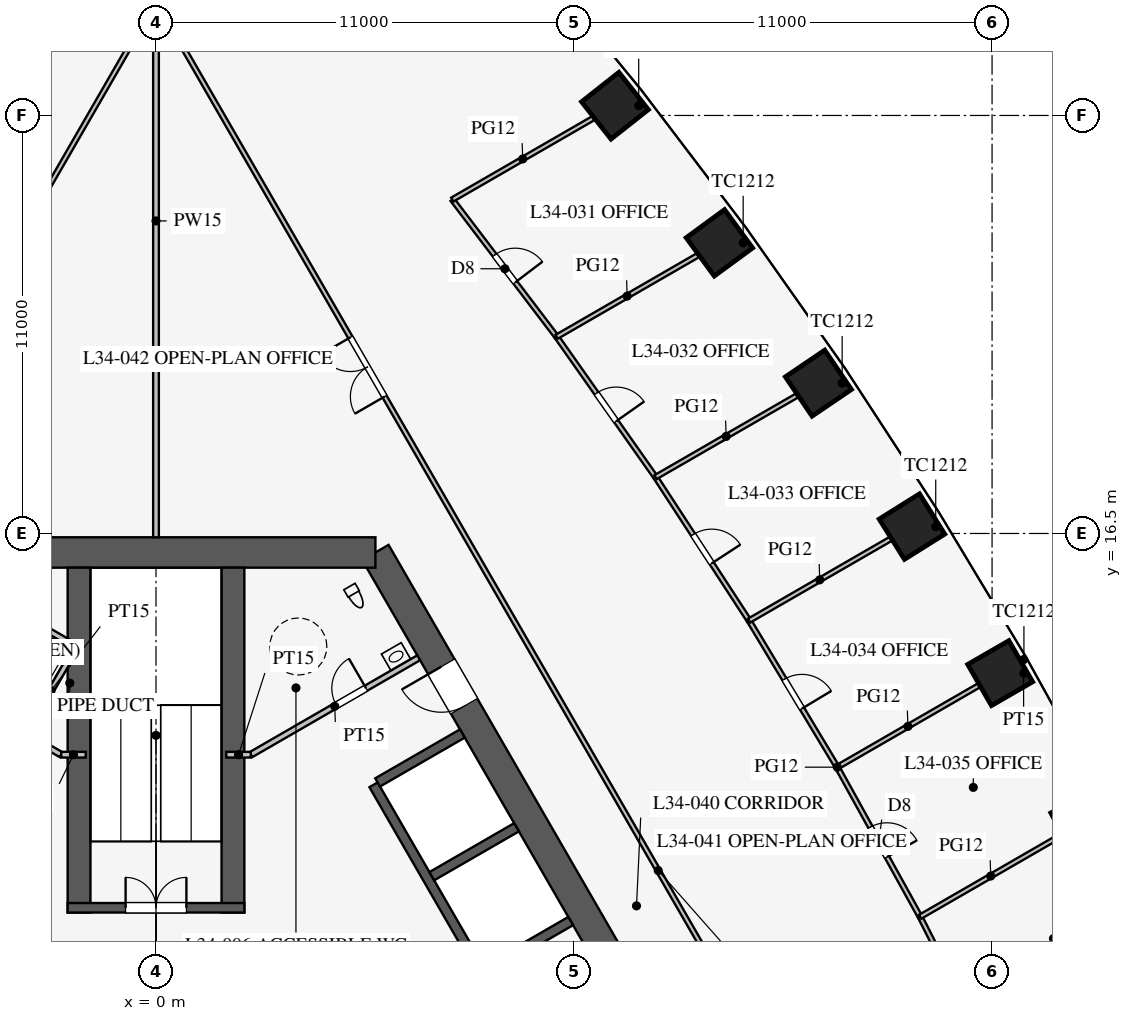
"""IFC4 building model, lengths in metres.
Left out: names, types, materials, properties, quantities, classifications, styles, units other than length and angle.
Written with IfcOpenShell. Run it as: python <this file> out.ifc"""

import sys

from ifc_helpers import new_model, si_unit, direction, frame, frame_2d, origin, origin_2d, place, context, subcontext, project, spatial, rectangle, extrude, element, fill, save


model = new_model("IFC4")
c1 = context("Model", 3, precision=1e-05, world=origin(), true_north=direction((0.0, 1.0)))
c2 = subcontext(c1, "Body", "Model", "MODEL_VIEW")
j1 = project(units=[si_unit("LENGTHUNIT", "METRE"), si_unit("PLANEANGLEUNIT", "RADIAN")], contexts=[c1])
p1 = place(None, origin())
s1 = spatial("IfcSite", under=j1, at=p1, CompositionType="ELEMENT")
p2 = place(p1, origin())
s2 = spatial("IfcBuilding", under=s1, at=p2, CompositionType="ELEMENT")
p3 = place(p2, frame((0.0, 0.0, 149.3)))
s3 = spatial("IfcBuildingStorey", under=s2, at=p3, CompositionType="ELEMENT", Elevation=149.3)
for number, where, z_axis, x_axis in (
    (1, (24.393, 8.887, 0.0), (0.0, 0.0, 1.0), (-0.468, 0.883, 0.0)),
    (2, (22.213, 12.825, 0.0), (0.0, 0.0, 1.0), (-0.5, 0.866, 0.0)),
    (3, (19.893, 16.681, 0.0), (0.0, 0.0, 1.0), (-0.531, 0.847, 0.0)),
    (4, (17.43, 20.456, 0.0), (0.0, 0.0, 1.0), (-0.561, 0.828, 0.0)),
    (5, (14.825, 24.148, 0.0), (0.0, 0.0, 1.0), (-0.591, 0.807, 0.0)),
    (6, (12.077, 27.757, 0.0), (0.0, 0.0, 1.0), (-0.62, 0.785, 0.0)),
):
    element("IfcColumn", number, at=place(p3, frame(where, z_axis=z_axis, x_axis=x_axis)), inside=s3, PredefinedType="COLUMN", context=c2, shape_type="SweptSolid", body=[
        extrude(rectangle(XDim=1.25, YDim=1.25, at=origin_2d()), origin(), (0.0, 0.0, 1.0), 4.2),
    ])
p4 = place(p3, frame((16.743, -3.0, 0.0), z_axis=(0.0, 0.0, 1.0), x_axis=(-0.500002442456, 0.866023993627, 0.0)))
e7 = element("IfcWall", 7, at=p4, inside=s3, PredefinedType="SHEAR", context=c2, shape_type="SweptSolid", body=[
    extrude(rectangle(XDim=21.939, YDim=0.8, at=frame_2d((10.97, 0.0))), origin(), (0.0, 0.0, 1.0), 4.2),
])
p5 = place(p4, frame((17.27, 0.0, 0.0)))
e8 = element("IfcOpeningElement", 8, at=p5, cuts=e7, PredefinedType="OPENING", context=c2, shape_type="SweptSolid", body=[
    extrude(rectangle(XDim=1.2, YDim=2.1, at=frame_2d((0.6, 1.05))), frame((0.0, 0.41, 0.0), z_axis=(0.0, -1.0, 0.0), x_axis=(1.0, 0.0, 0.0)), (0.0, 0.0, 1.0), 0.82),
])
p6 = place(p4, frame((3.47, 0.0, 0.0)))
e9 = element("IfcOpeningElement", 9, at=p6, cuts=e7, PredefinedType="OPENING", context=c2, shape_type="SweptSolid", body=[
    extrude(rectangle(XDim=1.2, YDim=2.1, at=frame_2d((0.6, 1.05))), frame((0.0, 0.41, 0.0), z_axis=(0.0, -1.0, 0.0), x_axis=(1.0, 0.0, 0.0)), (0.0, 0.0, 1.0), 0.82),
])
p7 = place(p3, frame((5.773, 16.0, 0.0), z_axis=(0.0, 0.0, 1.0), x_axis=(-1.0, 0.0, 0.0)))
e10 = element("IfcWall", 10, at=p7, inside=s3, PredefinedType="SHEAR", context=c2, shape_type="SweptSolid", body=[
    extrude(rectangle(XDim=11.547, YDim=0.8, at=frame_2d((5.773, 0.0))), origin(), (0.0, 0.0, 1.0), 4.2),
])
p8 = place(p3, frame((11.424, 0.014, 0.0), z_axis=(0.0, 0.0, 1.0), x_axis=(-0.500001763848, 0.866024385424, 0.0)))
e11 = element("IfcWall", 11, at=p8, inside=s3, PredefinedType="SHEAR", context=c2, shape_type="SweptSolid", body=[
    extrude(rectangle(XDim=11.4, YDim=0.25, at=frame_2d((5.7, 0.0))), origin(), (0.0, 0.0, 1.0), 4.2),
])
p9 = place(p8, frame((0.975, 0.0, 0.0)))
e12 = element("IfcOpeningElement", 12, at=p9, cuts=e11, PredefinedType="OPENING", context=c2, shape_type="SweptSolid", body=[
    extrude(rectangle(XDim=0.9, YDim=2.1, at=frame_2d((0.45, 1.05))), frame((0.0, 0.135, 0.0), z_axis=(0.0, -1.0, 0.0), x_axis=(1.0, 0.0, 0.0)), (0.0, 0.0, 1.0), 0.27),
])
p10 = place(p8, frame((3.825, 0.0, 0.0)))
e13 = element("IfcOpeningElement", 13, at=p10, cuts=e11, PredefinedType="OPENING", context=c2, shape_type="SweptSolid", body=[
    extrude(rectangle(XDim=0.9, YDim=2.1, at=frame_2d((0.45, 1.05))), frame((0.0, 0.135, 0.0), z_axis=(0.0, -1.0, 0.0), x_axis=(1.0, 0.0, 0.0)), (0.0, 0.0, 1.0), 0.27),
])
for number, where, z_axis, x_axis in (
    (14, (8.682, 5.012, 0.0), (0.0, 0.0, 1.0), (0.866, 0.5, 0.0)),
    (15, (7.257, 7.481, 0.0), (0.0, 0.0, 1.0), (0.866, 0.5, 0.0)),
):
    element("IfcWall", number, at=place(p3, frame(where, z_axis=z_axis, x_axis=x_axis)), inside=s3, PredefinedType="SHEAR", context=c2, shape_type="SweptSolid", body=[
        extrude(rectangle(XDim=2.575, YDim=0.25, at=frame_2d((1.288, 0.0))), origin(), (0.0, 0.0, 1.0), 4.2),
    ])
p11 = place(p3, frame((5.832, 9.949, 0.0), z_axis=(0.0, 0.0, 1.0), x_axis=(0.866029291668, 0.499993265928, 0.0)))
e16 = element("IfcWall", 16, at=p11, inside=s3, PredefinedType="SHEAR", context=c2, shape_type="SweptSolid", body=[
    extrude(rectangle(XDim=2.575, YDim=0.25, at=frame_2d((1.288, 0.0))), origin(), (0.0, 0.0, 1.0), 4.2),
])
for number, where, z_axis, x_axis in (
    (17, (2.025, 6.525, 0.0), (0.0, 0.0, 1.0), (0.0, 1.0, 0.0)),
    (18, (-2.025, 6.525, 0.0), (0.0, 0.0, 1.0), (0.0, 1.0, 0.0)),
):
    element("IfcWall", number, at=place(p3, frame(where, z_axis=z_axis, x_axis=x_axis)), inside=s3, PredefinedType="SHEAR", context=c2, shape_type="SweptSolid", body=[
        extrude(rectangle(XDim=9.075, YDim=0.6, at=frame_2d((4.538, 0.0))), origin(), (0.0, 0.0, 1.0), 4.2),
    ])
p12 = place(p3, frame((2.325, 6.65, 0.0), z_axis=(0.0, 0.0, 1.0), x_axis=(-1.0, 0.0, 0.0)))
e19 = element("IfcWall", 19, at=p12, inside=s3, PredefinedType="SHEAR", context=c2, shape_type="SweptSolid", body=[
    extrude(rectangle(XDim=4.65, YDim=0.25, at=frame_2d((2.325, 0.0))), origin(), (0.0, 0.0, 1.0), 4.2),
])
p13 = place(p12, frame((1.525, 0.0, 0.0)))
e20 = element("IfcOpeningElement", 20, at=p13, cuts=e19, PredefinedType="OPENING", context=c2, shape_type="SweptSolid", body=[
    extrude(rectangle(XDim=1.6, YDim=2.1, at=frame_2d((0.8, 1.05))), frame((0.0, 0.135, 0.0), z_axis=(0.0, -1.0, 0.0), x_axis=(1.0, 0.0, 0.0)), (0.0, 0.0, 1.0), 0.27),
])
p14 = place(p3, frame((2.495, 10.678, 0.0), z_axis=(0.0, 0.0, 1.0), x_axis=(0.86602216432, 0.500005610874, 0.0)))
e21 = element("IfcWall", 21, at=p14, inside=s3, PredefinedType="PARTITIONING", context=c2, shape_type="SweptSolid", body=[
    extrude(rectangle(XDim=5.1, YDim=0.15, at=frame_2d((2.55, 0.0))), origin(), (0.0, 0.0, 1.0), 4.0),
])
p15 = place(p14, frame((2.6, 0.0, 0.0)))
e22 = element("IfcOpeningElement", 22, at=p15, cuts=e21, PredefinedType="OPENING", context=c2, shape_type="SweptSolid", body=[
    extrude(rectangle(XDim=0.9, YDim=2.1, at=frame_2d((0.45, 1.05))), frame((0.0, 0.085, 0.0), z_axis=(0.0, -1.0, 0.0), x_axis=(1.0, 0.0, 0.0)), (0.0, 0.0, 1.0), 0.17),
])
p16 = place(p3, frame((-2.495, 10.678, 0.0), z_axis=(0.0, 0.0, 1.0), x_axis=(-0.86602216432, 0.500005610874, 0.0)))
e23 = element("IfcWall", 23, at=p16, inside=s3, PredefinedType="PARTITIONING", context=c2, shape_type="SweptSolid", body=[
    extrude(rectangle(XDim=5.1, YDim=0.15, at=frame_2d((2.55, 0.0))), origin(), (0.0, 0.0, 1.0), 4.0),
])
p17 = place(p16, frame((2.6, 0.0, 0.0)))
e24 = element("IfcOpeningElement", 24, at=p17, cuts=e23, PredefinedType="OPENING", context=c2, shape_type="SweptSolid", body=[
    extrude(rectangle(XDim=0.9, YDim=2.1, at=frame_2d((0.45, 1.05))), frame((0.0, 0.085, 0.0), z_axis=(0.0, -1.0, 0.0), x_axis=(1.0, 0.0, 0.0)), (0.0, 0.0, 1.0), 0.17),
])
for number, where, z_axis, x_axis in (
    (25, (2.495, 10.678, 0.0), (0.0, 0.0, 1.0), (-1.0, 0.0, 0.0)),
    (26, (-2.495, 10.678, 0.0), (0.0, 0.0, 1.0), (1.0, 0.0, 0.0)),
):
    element("IfcWall", number, at=place(p3, frame(where, z_axis=z_axis, x_axis=x_axis)), inside=s3, PredefinedType="PARTITIONING", context=c2, shape_type="SweptSolid", body=[
        extrude(rectangle(XDim=0.645, YDim=0.15, at=frame_2d((0.323, 0.0))), origin(), (0.0, 0.0, 1.0), 4.0),
    ])
p18 = place(p3, frame((-2.031, 13.482, 0.0), z_axis=(0.0, 0.0, 1.0), x_axis=(-0.866050731258, 0.499956128963, 0.0)))
e27 = element("IfcWall", 27, at=p18, inside=s3, PredefinedType="PARTITIONING", context=c2, shape_type="SweptSolid", body=[
    extrude(rectangle(XDim=4.1, YDim=0.15, at=frame_2d((2.05, 0.0))), origin(), (0.0, 0.0, 1.0), 4.0),
])
p19 = place(p3, frame((-3.389, 11.281, 0.0), z_axis=(0.0, 0.0, 1.0), x_axis=(0.499989096993, 0.866031698547, 0.0)))
e28 = element("IfcWall", 28, at=p19, inside=s3, PredefinedType="PARTITIONING", context=c2, shape_type="SweptSolid", body=[
    extrude(rectangle(XDim=2.51, YDim=0.15, at=frame_2d((1.255, 0.0))), origin(), (0.0, 0.0, 1.0), 4.0),
])
p20 = place(p3, frame((0.0, 16.4, 0.0), z_axis=(0.0, 0.0, 1.0), x_axis=(0.0, 1.0, 0.0)))
e29 = element("IfcWall", 29, at=p20, inside=s3, PredefinedType="PARTITIONING", context=c2, shape_type="SweptSolid", body=[
    extrude(rectangle(XDim=16.65, YDim=0.15, at=frame_2d((8.325, 0.0))), origin(), (0.0, 0.0, 1.0), 2.3),
])
p21 = place(p3, frame((26.415, -15.231, 0.0), z_axis=(0.0, 0.0, 1.0), x_axis=(-0.50000091641, 0.866024874695, 0.0)))
e30 = element("IfcWall", 30, at=p21, inside=s3, PredefinedType="PARTITIONING", context=c2, shape_type="SweptSolid", body=[
    extrude(rectangle(XDim=52.796, YDim=0.12, at=frame_2d((26.398, 0.0))), origin(), (0.0, 0.0, 1.0), 2.9),
])
p22 = place(p21, frame((10.2, 0.0, 0.15)))
e31 = element("IfcOpeningElement", 31, at=p22, cuts=e30, PredefinedType="OPENING", context=c2, shape_type="SweptSolid", body=[
    extrude(rectangle(XDim=1.8, YDim=2.1, at=frame_2d((0.9, 1.05))), frame((0.0, 0.07, 0.0), z_axis=(0.0, -1.0, 0.0), x_axis=(1.0, 0.0, 0.0)), (0.0, 0.0, 1.0), 0.14),
])
p23 = place(p21, frame((40.8, 0.0, 0.15)))
e32 = element("IfcOpeningElement", 32, at=p23, cuts=e30, PredefinedType="OPENING", context=c2, shape_type="SweptSolid", body=[
    extrude(rectangle(XDim=1.8, YDim=2.1, at=frame_2d((0.9, 1.05))), frame((0.0, 0.07, 0.0), z_axis=(0.0, -1.0, 0.0), x_axis=(1.0, 0.0, 0.0)), (0.0, 0.0, 1.0), 0.14),
])
p24 = place(p3, frame((22.758, 13.139, 0.0), z_axis=(0.0, 0.0, 1.0), x_axis=(0.866063163075, 0.499934593286, 0.0)))
e33 = element("IfcWall", 33, at=p24, inside=s3, PredefinedType="PARTITIONING", context=c2, shape_type="SweptSolid", body=[
    extrude(rectangle(XDim=0.166, YDim=0.15, at=frame_2d((0.083, 0.0))), origin(), (0.0, 0.0, 1.0), 2.9),
])
p25 = place(p3, frame((17.927, 10.35, 0.0), z_axis=(0.0, 0.0, 1.0), x_axis=(-0.515548366618, 0.856860479703, 0.0)))
e34 = element("IfcWall", 34, at=p25, inside=s3, PredefinedType="PARTITIONING", context=c2, shape_type="SweptSolid", body=[
    extrude(rectangle(XDim=4.501, YDim=0.12, at=frame_2d((2.25, 0.0))), origin(), (0.0, 0.0, 1.0), 2.9),
])
p26 = place(p25, frame((1.8, 0.0, 0.15)))
e35 = element("IfcOpeningElement", 35, at=p26, cuts=e34, PredefinedType="OPENING", context=c2, shape_type="SweptSolid", body=[
    extrude(rectangle(XDim=0.9, YDim=2.1, at=frame_2d((0.45, 1.05))), frame((0.0, 0.07, 0.0), z_axis=(0.0, -1.0, 0.0), x_axis=(1.0, 0.0, 0.0)), (0.0, 0.0, 1.0), 0.14),
])
p27 = place(p3, frame((10.543, 21.675, 0.0), z_axis=(0.0, 0.0, 1.0), x_axis=(-0.605274299339, 0.796016973789, 0.0)))
e36 = element("IfcWall", 36, at=p27, inside=s3, PredefinedType="PARTITIONING", context=c2, shape_type="SweptSolid", body=[
    extrude(rectangle(XDim=4.536, YDim=0.12, at=frame_2d((2.268, 0.0))), origin(), (0.0, 0.0, 1.0), 2.9),
])
p28 = place(p27, frame((1.8, 0.0, 0.15)))
e37 = element("IfcOpeningElement", 37, at=p28, cuts=e36, PredefinedType="OPENING", context=c2, shape_type="SweptSolid", body=[
    extrude(rectangle(XDim=0.9, YDim=2.1, at=frame_2d((0.45, 1.05))), frame((0.0, 0.07, 0.0), z_axis=(0.0, -1.0, 0.0), x_axis=(1.0, 0.0, 0.0)), (0.0, 0.0, 1.0), 0.14),
])
p29 = place(p3, frame((15.606, 14.206, 0.0), z_axis=(0.0, 0.0, 1.0), x_axis=(-0.546069464151, 0.837739900161, 0.0)))
e38 = element("IfcWall", 38, at=p29, inside=s3, PredefinedType="PARTITIONING", context=c2, shape_type="SweptSolid", body=[
    extrude(rectangle(XDim=4.507, YDim=0.12, at=frame_2d((2.253, 0.0))), origin(), (0.0, 0.0, 1.0), 2.9),
])
p30 = place(p29, frame((1.8, 0.0, 0.15)))
e39 = element("IfcOpeningElement", 39, at=p30, cuts=e38, PredefinedType="OPENING", context=c2, shape_type="SweptSolid", body=[
    extrude(rectangle(XDim=0.9, YDim=2.1, at=frame_2d((0.45, 1.05))), frame((0.0, 0.07, 0.0), z_axis=(0.0, -1.0, 0.0), x_axis=(1.0, 0.0, 0.0)), (0.0, 0.0, 1.0), 0.14),
])
p31 = place(p3, frame((13.145, 17.982, 0.0), z_axis=(0.0, 0.0, 1.0), x_axis=(-0.575987178736, 0.817458726745, 0.0)))
e40 = element("IfcWall", 40, at=p31, inside=s3, PredefinedType="PARTITIONING", context=c2, shape_type="SweptSolid", body=[
    extrude(rectangle(XDim=4.518, YDim=0.12, at=frame_2d((2.259, 0.0))), origin(), (0.0, 0.0, 1.0), 2.9),
])
p32 = place(p31, frame((1.8, 0.0, 0.15)))
e41 = element("IfcOpeningElement", 41, at=p32, cuts=e40, PredefinedType="OPENING", context=c2, shape_type="SweptSolid", body=[
    extrude(rectangle(XDim=0.9, YDim=2.1, at=frame_2d((0.45, 1.05))), frame((0.0, 0.07, 0.0), z_axis=(0.0, -1.0, 0.0), x_axis=(1.0, 0.0, 0.0)), (0.0, 0.0, 1.0), 0.14),
])
p33 = place(p3, frame((20.106, 6.412, 0.0), z_axis=(0.0, 0.0, 1.0), x_axis=(-0.484292898211, 0.874905931368, 0.0)))
e42 = element("IfcWall", 42, at=p33, inside=s3, PredefinedType="PARTITIONING", context=c2, shape_type="SweptSolid", body=[
    extrude(rectangle(XDim=4.501, YDim=0.12, at=frame_2d((2.25, 0.0))), origin(), (0.0, 0.0, 1.0), 2.9),
])
p34 = place(p33, frame((1.8, 0.0, 0.15)))
e43 = element("IfcOpeningElement", 43, at=p34, cuts=e42, PredefinedType="OPENING", context=c2, shape_type="SweptSolid", body=[
    extrude(rectangle(XDim=0.9, YDim=2.1, at=frame_2d((0.45, 1.05))), frame((0.0, 0.07, 0.0), z_axis=(0.0, -1.0, 0.0), x_axis=(1.0, 0.0, 0.0)), (0.0, 0.0, 1.0), 0.14),
])
p35 = place(p3, frame((22.145, 2.393, 0.0), z_axis=(0.0, 0.0, 1.0), x_axis=(-0.452471679136, 0.891778772779, 0.0)))
e44 = element("IfcWall", 44, at=p35, inside=s3, PredefinedType="PARTITIONING", context=c2, shape_type="SweptSolid", body=[
    extrude(rectangle(XDim=4.507, YDim=0.12, at=frame_2d((2.253, 0.0))), origin(), (0.0, 0.0, 1.0), 2.9),
])
p36 = place(p35, frame((1.75, 0.0, 0.15)))
e45 = element("IfcOpeningElement", 45, at=p36, cuts=e44, PredefinedType="OPENING", context=c2, shape_type="SweptSolid", body=[
    extrude(rectangle(XDim=1.0, YDim=2.1, at=frame_2d((0.5, 1.05))), frame((0.0, 0.07, 0.0), z_axis=(0.0, -1.0, 0.0), x_axis=(1.0, 0.0, 0.0)), (0.0, 0.0, 1.0), 0.14),
])
p37 = place(p3, frame((17.927, 10.35, 0.0), z_axis=(0.0, 0.0, 1.0), x_axis=(0.866023714033, 0.500002926724, 0.0)))
e46 = element("IfcWall", 46, at=p37, inside=s3, PredefinedType="PARTITIONING", context=c2, shape_type="SweptSolid", body=[
    extrude(rectangle(XDim=4.295, YDim=0.12, at=frame_2d((2.147, 0.0))), origin(), (0.0, 0.0, 1.0), 2.9),
])
p38 = place(p3, frame((10.543, 21.675, 0.0), z_axis=(0.0, 0.0, 1.0), x_axis=(0.866040468838, 0.499973905654, 0.0)))
e47 = element("IfcWall", 47, at=p38, inside=s3, PredefinedType="PARTITIONING", context=c2, shape_type="SweptSolid", body=[
    extrude(rectangle(XDim=4.286, YDim=0.12, at=frame_2d((2.143, 0.0))), origin(), (0.0, 0.0, 1.0), 2.9),
])
p39 = place(p3, frame((7.797, 25.286, 0.0), z_axis=(0.0, 0.0, 1.0), x_axis=(0.866019337872, 0.500010506321, 0.0)))
e48 = element("IfcWall", 48, at=p39, inside=s3, PredefinedType="PARTITIONING", context=c2, shape_type="SweptSolid", body=[
    extrude(rectangle(XDim=4.28, YDim=0.12, at=frame_2d((2.14, 0.0))), origin(), (0.0, 0.0, 1.0), 2.9),
])
p40 = place(p3, frame((15.606, 14.206, 0.0), z_axis=(0.0, 0.0, 1.0), x_axis=(0.866005690956, 0.500034142066, 0.0)))
e49 = element("IfcWall", 49, at=p40, inside=s3, PredefinedType="PARTITIONING", context=c2, shape_type="SweptSolid", body=[
    extrude(rectangle(XDim=4.294, YDim=0.12, at=frame_2d((2.147, 0.0))), origin(), (0.0, 0.0, 1.0), 2.9),
])
p41 = place(p3, frame((13.145, 17.982, 0.0), z_axis=(0.0, 0.0, 1.0), x_axis=(0.866035893414, 0.499981830989, 0.0)))
e50 = element("IfcWall", 50, at=p41, inside=s3, PredefinedType="PARTITIONING", context=c2, shape_type="SweptSolid", body=[
    extrude(rectangle(XDim=4.291, YDim=0.12, at=frame_2d((2.146, 0.0))), origin(), (0.0, 0.0, 1.0), 2.9),
])
p42 = place(p3, frame((20.106, 6.412, 0.0), z_axis=(0.0, 0.0, 1.0), x_axis=(0.866030310389, 0.499991501415, 0.0)))
e51 = element("IfcWall", 51, at=p42, inside=s3, PredefinedType="PARTITIONING", context=c2, shape_type="SweptSolid", body=[
    extrude(rectangle(XDim=4.294, YDim=0.12, at=frame_2d((2.147, 0.0))), origin(), (0.0, 0.0, 1.0), 2.9),
])
p43 = place(p3, frame((-0.016, 30.491, 0.0), z_axis=(0.0, 0.0, 1.0), x_axis=(-0.50000091641, -0.866024874695, 0.0)))
e52 = element("IfcWall", 52, at=p43, inside=s3, PredefinedType="PARTITIONING", context=c2, shape_type="SweptSolid", body=[
    extrude(rectangle(XDim=52.796, YDim=0.12, at=frame_2d((26.398, 0.0))), origin(), (0.0, 0.0, 1.0), 2.9),
])
p44 = place(p43, frame((10.2, 0.0, 0.15)))
e53 = element("IfcOpeningElement", 53, at=p44, cuts=e52, PredefinedType="OPENING", context=c2, shape_type="SweptSolid", body=[
    extrude(rectangle(XDim=1.8, YDim=2.1, at=frame_2d((0.9, 1.05))), frame((0.0, 0.07, 0.0), z_axis=(0.0, -1.0, 0.0), x_axis=(1.0, 0.0, 0.0)), (0.0, 0.0, 1.0), 0.14),
])
p45 = place(p43, frame((40.8, 0.0, 0.15)))
e54 = element("IfcOpeningElement", 54, at=p45, cuts=e52, PredefinedType="OPENING", context=c2, shape_type="SweptSolid", body=[
    extrude(rectangle(XDim=1.8, YDim=2.1, at=frame_2d((0.9, 1.05))), frame((0.0, 0.07, 0.0), z_axis=(0.0, -1.0, 0.0), x_axis=(1.0, 0.0, 0.0)), (0.0, 0.0, 1.0), 0.14),
])
p46 = place(p15, origin())
e55 = element("IfcDoor", 55, at=p46, inside=s3, OperationType="SINGLE_SWING_RIGHT", PredefinedType="DOOR", context=c2, shape_type="SweptSolid", body=[
    extrude(rectangle(XDim=0.9, YDim=2.1, at=frame_2d((0.45, 1.05))), frame((0.0, 0.025, 0.0), z_axis=(0.0, -1.0, 0.0), x_axis=(1.0, 0.0, 0.0)), (0.0, 0.0, 1.0), 0.05),
])
fill(e22, e55)
p47 = place(p13, frame((1.6, 0.0, 0.0), z_axis=(0.0, 0.0, 1.0), x_axis=(-1.0, 0.0, 0.0)))
e56 = element("IfcDoor", 56, at=p47, inside=s3, OperationType="DOUBLE_DOOR_SINGLE_SWING", PredefinedType="DOOR", context=c2, shape_type="SweptSolid", body=[
    extrude(rectangle(XDim=1.6, YDim=2.1, at=frame_2d((0.8, 1.05))), frame((0.0, 0.025, 0.0), z_axis=(0.0, -1.0, 0.0), x_axis=(1.0, 0.0, 0.0)), (0.0, 0.0, 1.0), 0.05),
])
fill(e20, e56)
p48 = place(p5, origin())
e57 = element("IfcDoor", 57, at=p48, inside=s3, OperationType="SINGLE_SWING_RIGHT", PredefinedType="DOOR", context=c2, shape_type="SweptSolid", body=[
    extrude(rectangle(XDim=1.2, YDim=2.1, at=frame_2d((0.6, 1.05))), frame((0.0, 0.025, 0.0), z_axis=(0.0, -1.0, 0.0), x_axis=(1.0, 0.0, 0.0)), (0.0, 0.0, 1.0), 0.05),
])
fill(e8, e57)
p49 = place(p28, frame((0.9, 0.0, 0.0), z_axis=(0.0, 0.0, 1.0), x_axis=(-1.0, 0.0, 0.0)))
e58 = element("IfcDoor", 58, at=p49, inside=s3, OperationType="SINGLE_SWING_RIGHT", PredefinedType="DOOR", context=c2, shape_type="SweptSolid", body=[
    extrude(rectangle(XDim=0.9, YDim=2.1, at=frame_2d((0.45, 1.05))), frame((0.0, 0.025, 0.0), z_axis=(0.0, -1.0, 0.0), x_axis=(1.0, 0.0, 0.0)), (0.0, 0.0, 1.0), 0.05),
])
fill(e37, e58)
p50 = place(p32, frame((0.9, 0.0, 0.0), z_axis=(0.0, 0.0, 1.0), x_axis=(-1.0, 0.0, 0.0)))
e59 = element("IfcDoor", 59, at=p50, inside=s3, OperationType="SINGLE_SWING_RIGHT", PredefinedType="DOOR", context=c2, shape_type="SweptSolid", body=[
    extrude(rectangle(XDim=0.9, YDim=2.1, at=frame_2d((0.45, 1.05))), frame((0.0, 0.025, 0.0), z_axis=(0.0, -1.0, 0.0), x_axis=(1.0, 0.0, 0.0)), (0.0, 0.0, 1.0), 0.05),
])
fill(e41, e59)
p51 = place(p30, frame((0.9, 0.0, 0.0), z_axis=(0.0, 0.0, 1.0), x_axis=(-1.0, 0.0, 0.0)))
e60 = element("IfcDoor", 60, at=p51, inside=s3, OperationType="SINGLE_SWING_RIGHT", PredefinedType="DOOR", context=c2, shape_type="SweptSolid", body=[
    extrude(rectangle(XDim=0.9, YDim=2.1, at=frame_2d((0.45, 1.05))), frame((0.0, 0.025, 0.0), z_axis=(0.0, -1.0, 0.0), x_axis=(1.0, 0.0, 0.0)), (0.0, 0.0, 1.0), 0.05),
])
fill(e39, e60)
p52 = place(p26, frame((0.9, 0.0, 0.0), z_axis=(0.0, 0.0, 1.0), x_axis=(-1.0, 0.0, 0.0)))
e61 = element("IfcDoor", 61, at=p52, inside=s3, OperationType="SINGLE_SWING_RIGHT", PredefinedType="DOOR", context=c2, shape_type="SweptSolid", body=[
    extrude(rectangle(XDim=0.9, YDim=2.1, at=frame_2d((0.45, 1.05))), frame((0.0, 0.025, 0.0), z_axis=(0.0, -1.0, 0.0), x_axis=(1.0, 0.0, 0.0)), (0.0, 0.0, 1.0), 0.05),
])
fill(e35, e61)
p53 = place(p34, frame((0.9, 0.0, 0.0), z_axis=(0.0, 0.0, 1.0), x_axis=(-1.0, 0.0, 0.0)))
e62 = element("IfcDoor", 62, at=p53, inside=s3, OperationType="SINGLE_SWING_RIGHT", PredefinedType="DOOR", context=c2, shape_type="SweptSolid", body=[
    extrude(rectangle(XDim=0.9, YDim=2.1, at=frame_2d((0.45, 1.05))), frame((0.0, 0.025, 0.0), z_axis=(0.0, -1.0, 0.0), x_axis=(1.0, 0.0, 0.0)), (0.0, 0.0, 1.0), 0.05),
])
fill(e43, e62)
p54 = place(p23, origin())
e63 = element("IfcDoor", 63, at=p54, inside=s3, OperationType="DOUBLE_DOOR_SINGLE_SWING", PredefinedType="DOOR", context=c2, shape_type="SweptSolid", body=[
    extrude(rectangle(XDim=1.8, YDim=2.1, at=frame_2d((0.9, 1.05))), frame((0.0, 0.025, 0.0), z_axis=(0.0, -1.0, 0.0), x_axis=(1.0, 0.0, 0.0)), (0.0, 0.0, 1.0), 0.05),
])
fill(e32, e63)
save(model, sys.argv[1])
